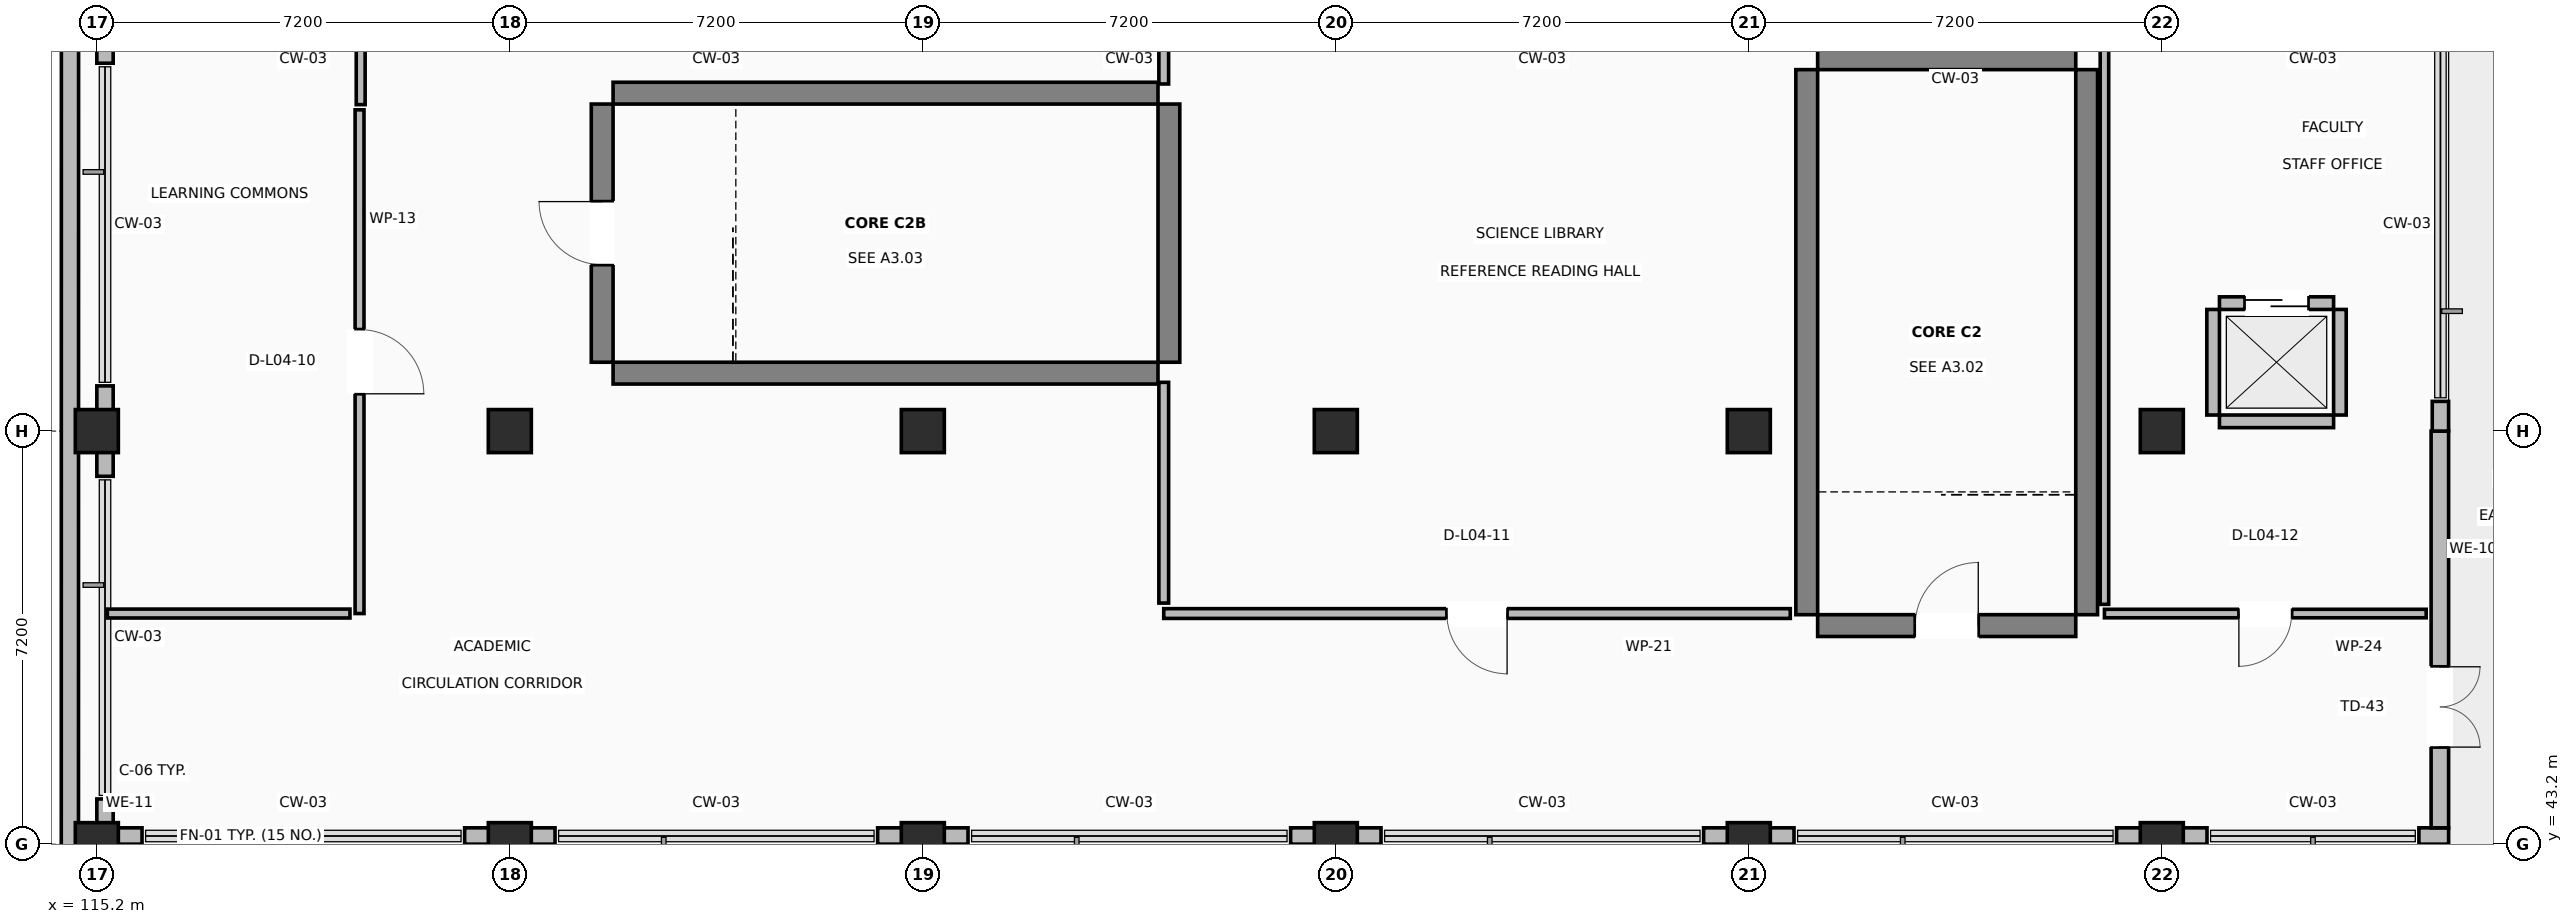
"""IFC4 building model, lengths in metres.
Left out: names, types, materials, properties, quantities, classifications, styles, units other than length and angle.
Written with IfcOpenShell. Run it as: python <this file> out.ifc"""

import sys

from ifc_helpers import new_model, si_unit, direction, frame, frame_2d, origin, origin_2d, place, context, subcontext, project, spatial, rectangle, extrude, element, fill, save


model = new_model("IFC4")
c1 = context("Model", 3, precision=1e-05, world=origin(), true_north=direction((0.0, 1.0)))
c2 = subcontext(c1, "Body", "Model", "MODEL_VIEW")
j1 = project(units=[si_unit("LENGTHUNIT", "METRE"), si_unit("PLANEANGLEUNIT", "RADIAN")], contexts=[c1])
p1 = place(None, origin())
s1 = spatial("IfcSite", under=j1, at=p1, CompositionType="ELEMENT")
p2 = place(p1, origin())
s2 = spatial("IfcBuilding", under=s1, at=p2, CompositionType="ELEMENT")
p3 = place(p2, frame((0.0, 0.0, 18.0)))
s3 = spatial("IfcBuildingStorey", under=s2, at=p3, CompositionType="ELEMENT", Elevation=18.0)
for number, where, z_axis, x_axis in (
    (1, (115.2, 43.2, 0.0), (0.0, 0.0, 1.0), (1.0, 0.0, 0.0)),
    (2, (115.2, 50.4, 0.0), (0.0, 0.0, 1.0), (1.0, 0.0, 0.0)),
    (3, (122.4, 43.2, 0.0), (0.0, 0.0, 1.0), (1.0, 0.0, 0.0)),
    (4, (122.4, 50.4, 0.0), (0.0, 0.0, 1.0), (1.0, 0.0, 0.0)),
    (5, (129.6, 43.2, 0.0), (0.0, 0.0, 1.0), (1.0, 0.0, 0.0)),
    (6, (129.6, 50.4, 0.0), (0.0, 0.0, 1.0), (1.0, 0.0, 0.0)),
    (7, (136.8, 43.2, 0.0), (0.0, 0.0, 1.0), (1.0, 0.0, 0.0)),
    (8, (136.8, 50.4, 0.0), (0.0, 0.0, 1.0), (1.0, 0.0, 0.0)),
    (9, (144.0, 43.2, 0.0), (0.0, 0.0, 1.0), (1.0, 0.0, 0.0)),
    (10, (144.0, 50.4, 0.0), (0.0, 0.0, 1.0), (1.0, 0.0, 0.0)),
    (11, (151.2, 43.2, 0.0), (0.0, 0.0, 1.0), (1.0, 0.0, 0.0)),
    (12, (151.2, 50.4, 0.0), (0.0, 0.0, 1.0), (1.0, 0.0, 0.0)),
):
    element("IfcColumn", number, at=place(p3, frame(where, z_axis=z_axis, x_axis=x_axis)), inside=s3, PredefinedType="COLUMN", context=c2, shape_type="SweptSolid", body=[
        extrude(rectangle(XDim=0.75, YDim=0.75, at=origin_2d()), origin(), (0.0, 0.0, 1.0), 4.5),
    ])
p4 = place(p3, frame((145.2, 47.01, 0.0), z_axis=(0.0, 0.0, 1.0), x_axis=(1.0, 0.0, 0.0)))
e13 = element("IfcWall", 13, at=p4, inside=s3, PredefinedType="SHEAR", context=c2, shape_type="SweptSolid", body=[
    extrude(rectangle(XDim=4.5, YDim=0.38, at=frame_2d((2.25, 0.0))), origin(), (0.0, 0.0, 1.0), 4.22),
])
p5 = place(p4, frame((1.7, 0.0, 0.0)))
e14 = element("IfcOpeningElement", 14, at=p5, cuts=e13, PredefinedType="OPENING", context=c2, shape_type="SweptSolid", body=[
    extrude(rectangle(XDim=1.1, YDim=2.15, at=frame_2d((0.55, 1.075))), frame((0.0, 0.2, 0.0), z_axis=(0.0, -1.0, 0.0), x_axis=(1.0, 0.0, 0.0)), (0.0, 0.0, 1.0), 0.4),
])
p6 = place(p3, frame((145.2, 56.89, 0.0), z_axis=(0.0, 0.0, 1.0), x_axis=(1.0, 0.0, 0.0)))
e15 = element("IfcWall", 15, at=p6, inside=s3, PredefinedType="SHEAR", context=c2, shape_type="SweptSolid", body=[
    extrude(rectangle(XDim=4.5, YDim=0.38, at=frame_2d((2.25, 0.0))), origin(), (0.0, 0.0, 1.0), 4.22),
])
for number, where, z_axis, x_axis in (
    (16, (145.01, 47.2, 0.0), (0.0, 0.0, 1.0), (0.0, 1.0, 0.0)),
    (17, (149.89, 47.2, 0.0), (0.0, 0.0, 1.0), (0.0, 1.0, 0.0)),
    (18, (124.2, 51.41, 0.0), (0.0, 0.0, 1.0), (1.0, 0.0, 0.0)),
    (19, (124.2, 56.29, 0.0), (0.0, 0.0, 1.0), (1.0, 0.0, 0.0)),
):
    element("IfcWall", number, at=place(p3, frame(where, z_axis=z_axis, x_axis=x_axis)), inside=s3, PredefinedType="SHEAR", context=c2, shape_type="SweptSolid", body=[
        extrude(rectangle(XDim=9.5, YDim=0.38, at=frame_2d((4.75, 0.0))), origin(), (0.0, 0.0, 1.0), 4.22),
    ])
p7 = place(p3, frame((124.01, 51.6, 0.0), z_axis=(0.0, 0.0, 1.0), x_axis=(0.0, 1.0, 0.0)))
e20 = element("IfcWall", 20, at=p7, inside=s3, PredefinedType="SHEAR", context=c2, shape_type="SweptSolid", body=[
    extrude(rectangle(XDim=4.5, YDim=0.38, at=frame_2d((2.25, 0.0))), origin(), (0.0, 0.0, 1.0), 4.22),
])
p8 = place(p7, frame((1.7, 0.0, 0.0)))
e21 = element("IfcOpeningElement", 21, at=p8, cuts=e20, PredefinedType="OPENING", context=c2, shape_type="SweptSolid", body=[
    extrude(rectangle(XDim=1.1, YDim=2.15, at=frame_2d((0.55, 1.075))), frame((0.0, 0.2, 0.0), z_axis=(0.0, -1.0, 0.0), x_axis=(1.0, 0.0, 0.0)), (0.0, 0.0, 1.0), 0.4),
])
p9 = place(p3, frame((133.89, 51.6, 0.0), z_axis=(0.0, 0.0, 1.0), x_axis=(0.0, 1.0, 0.0)))
e22 = element("IfcWall", 22, at=p9, inside=s3, PredefinedType="SHEAR", context=c2, shape_type="SweptSolid", body=[
    extrude(rectangle(XDim=4.5, YDim=0.38, at=frame_2d((2.25, 0.0))), origin(), (0.0, 0.0, 1.0), 4.22),
])
p10 = place(p3, frame((115.2, 43.343, 0.0), z_axis=(0.0, 0.0, 1.0), x_axis=(1.0, 0.0, 0.0)))
e23 = element("IfcWall", 23, at=p10, inside=s3, PredefinedType="STANDARD", context=c2, shape_type="SweptSolid", body=[
    extrude(rectangle(XDim=0.788, YDim=0.285, at=frame_2d((0.394, 0.0))), origin(), (0.0, 0.0, 1.0), 3.26),
])
for number, where, z_axis, x_axis in (
    (24, (121.612, 43.343, 0.0), (0.0, 0.0, 1.0), (1.0, 0.0, 0.0)),
    (25, (128.812, 43.343, 0.0), (0.0, 0.0, 1.0), (1.0, 0.0, 0.0)),
    (26, (136.012, 43.343, 0.0), (0.0, 0.0, 1.0), (1.0, 0.0, 0.0)),
):
    element("IfcWall", number, at=place(p3, frame(where, z_axis=z_axis, x_axis=x_axis)), inside=s3, PredefinedType="STANDARD", context=c2, shape_type="SweptSolid", body=[
        extrude(rectangle(XDim=1.576, YDim=0.285, at=frame_2d((0.788, 0.0))), origin(), (0.0, 0.0, 1.0), 3.26),
    ])
p11 = place(p3, frame((143.212, 43.343, 0.0), z_axis=(0.0, 0.0, 1.0), x_axis=(1.0, 0.0, 0.0)))
e27 = element("IfcWall", 27, at=p11, inside=s3, PredefinedType="STANDARD", context=c2, shape_type="SweptSolid", body=[
    extrude(rectangle(XDim=1.576, YDim=0.285, at=frame_2d((0.788, 0.0))), origin(), (0.0, 0.0, 1.0), 3.26),
])
p12 = place(p3, frame((150.412, 43.343, 0.0), z_axis=(0.0, 0.0, 1.0), x_axis=(1.0, 0.0, 0.0)))
e28 = element("IfcWall", 28, at=p12, inside=s3, PredefinedType="STANDARD", context=c2, shape_type="SweptSolid", body=[
    extrude(rectangle(XDim=1.576, YDim=0.285, at=frame_2d((0.788, 0.0))), origin(), (0.0, 0.0, 1.0), 3.26),
])
p13 = place(p3, frame((155.682, 43.343, 0.0), z_axis=(0.0, 0.0, 1.0), x_axis=(1.0, 0.0, 0.0)))
e29 = element("IfcWall", 29, at=p13, inside=s3, PredefinedType="STANDARD", context=c2, shape_type="SweptSolid", body=[
    extrude(rectangle(XDim=0.518, YDim=0.285, at=frame_2d((0.259, 0.0))), origin(), (0.0, 0.0, 1.0), 3.26),
])
p14 = place(p3, frame((156.048, 50.4, 0.0), z_axis=(0.0, 0.0, 1.0), x_axis=(0.0, -1.0, 0.0)))
e30 = element("IfcWall", 30, at=p14, inside=s3, PredefinedType="STANDARD", context=c2, shape_type="SweptSolid", body=[
    extrude(rectangle(XDim=6.915, YDim=0.305, at=frame_2d((3.458, 0.0))), origin(), (0.0, 0.0, 1.0), 3.26),
])
p15 = place(p14, frame((4.108, 0.0, 0.0)))
e31 = element("IfcOpeningElement", 31, at=p15, cuts=e30, PredefinedType="OPENING", context=c2, shape_type="SweptSolid", body=[
    extrude(rectangle(XDim=1.4, YDim=2.15, at=frame_2d((0.7, 1.075))), frame((0.0, 0.162, 0.0), z_axis=(0.0, -1.0, 0.0), x_axis=(1.0, 0.0, 0.0)), (0.0, 0.0, 1.0), 0.325),
])
p16 = place(p3, frame((156.058, 50.4, 0.0), z_axis=(0.0, 0.0, 1.0), x_axis=(0.0, 1.0, 0.0)))
e32 = element("IfcWall", 32, at=p16, inside=s3, PredefinedType="STANDARD", context=c2, shape_type="SweptSolid", body=[
    extrude(rectangle(XDim=0.518, YDim=0.285, at=frame_2d((0.259, 0.0))), origin(), (0.0, 0.0, 1.0), 3.26),
])
p17 = place(p3, frame((115.343, 57.315, 0.0), z_axis=(0.0, 0.0, 1.0), x_axis=(0.0, -1.0, 0.0)))
e33 = element("IfcWall", 33, at=p17, inside=s3, PredefinedType="STANDARD", context=c2, shape_type="SweptSolid", body=[
    extrude(rectangle(XDim=0.503, YDim=0.285, at=frame_2d((0.251, 0.0))), origin(), (0.0, 0.0, 1.0), 3.26),
])
p18 = place(p3, frame((115.343, 51.188, 0.0), z_axis=(0.0, 0.0, 1.0), x_axis=(0.0, -1.0, 0.0)))
e34 = element("IfcWall", 34, at=p18, inside=s3, PredefinedType="STANDARD", context=c2, shape_type="SweptSolid", body=[
    extrude(rectangle(XDim=1.576, YDim=0.285, at=frame_2d((0.788, 0.0))), origin(), (0.0, 0.0, 1.0), 3.26),
])
p19 = place(p3, frame((115.343, 43.988, 0.0), z_axis=(0.0, 0.0, 1.0), x_axis=(0.0, -1.0, 0.0)))
e35 = element("IfcWall", 35, at=p19, inside=s3, PredefinedType="STANDARD", context=c2, shape_type="SweptSolid", body=[
    extrude(rectangle(XDim=0.503, YDim=0.285, at=frame_2d((0.251, 0.0))), origin(), (0.0, 0.0, 1.0), 3.26),
])
p20 = place(p3, frame((114.73, 42.882, 0.0), z_axis=(0.0, 0.0, 1.0), x_axis=(0.000129880671, 0.999999991566, 0.0)))
e36 = element("IfcWall", 36, at=p20, inside=s3, PredefinedType="PARAPET", context=c2, shape_type="SweptSolid", body=[
    extrude(rectangle(XDim=15.038, YDim=0.3, at=frame_2d((7.519, 0.0))), origin(), (0.0, 0.0, 1.0), 1.18),
])
p21 = place(p3, frame((152.205, 50.57, 0.0), z_axis=(0.0, 0.0, 1.0), x_axis=(1.0, 0.0, 0.0)))
e37 = element("IfcWall", 37, at=p21, inside=s3, PredefinedType="STANDARD", context=c2, shape_type="SweptSolid", body=[
    extrude(rectangle(XDim=1.99, YDim=0.22, at=frame_2d((0.995, 0.0))), origin(), (0.0, 0.0, 1.0), 3.26),
])
p22 = place(p3, frame((152.205, 52.63, 0.0), z_axis=(0.0, 0.0, 1.0), x_axis=(1.0, 0.0, 0.0)))
e38 = element("IfcWall", 38, at=p22, inside=s3, PredefinedType="STANDARD", context=c2, shape_type="SweptSolid", body=[
    extrude(rectangle(XDim=1.99, YDim=0.22, at=frame_2d((0.995, 0.0))), origin(), (0.0, 0.0, 1.0), 3.26),
])
p23 = place(p22, frame((0.445, 0.0, 0.0)))
e39 = element("IfcOpeningElement", 39, at=p23, cuts=e38, PredefinedType="OPENING", context=c2, shape_type="SweptSolid", body=[
    extrude(rectangle(XDim=1.1, YDim=2.15, at=frame_2d((0.55, 1.075))), frame((0.0, 0.12, 0.0), z_axis=(0.0, -1.0, 0.0), x_axis=(1.0, 0.0, 0.0)), (0.0, 0.0, 1.0), 0.24),
])
for number, where, z_axis, x_axis in (
    (40, (152.095, 50.68, 0.0), (0.0, 0.0, 1.0), (0.0, 1.0, 0.0)),
    (41, (154.305, 50.68, 0.0), (0.0, 0.0, 1.0), (0.0, 1.0, 0.0)),
):
    element("IfcWall", number, at=place(p3, frame(where, z_axis=z_axis, x_axis=x_axis)), inside=s3, PredefinedType="STANDARD", context=c2, shape_type="SweptSolid", body=[
        extrude(rectangle(XDim=1.84, YDim=0.22, at=frame_2d((0.92, 0.0))), origin(), (0.0, 0.0, 1.0), 3.26),
    ])
p24 = place(p3, frame((119.78, 56.0, 0.0), z_axis=(0.0, 0.0, 1.0), x_axis=(0.0, -1.0, 0.0)))
e42 = element("IfcWall", 42, at=p24, inside=s3, PredefinedType="PARTITIONING", context=c2, shape_type="SweptSolid", body=[
    extrude(rectangle(XDim=8.78, YDim=0.155, at=frame_2d((4.39, 0.0))), origin(), (0.0, 0.0, 1.0), 3.26),
])
p25 = place(p24, frame((3.83, 0.0, 0.0)))
e43 = element("IfcOpeningElement", 43, at=p25, cuts=e42, PredefinedType="OPENING", context=c2, shape_type="SweptSolid", body=[
    extrude(rectangle(XDim=1.12, YDim=2.15, at=frame_2d((0.56, 1.075))), frame((0.0, 0.087, 0.0), z_axis=(0.0, -1.0, 0.0), x_axis=(1.0, 0.0, 0.0)), (0.0, 0.0, 1.0), 0.175),
])
p26 = place(p3, frame((119.613, 47.22, 0.0), z_axis=(0.0, 0.0, 1.0), x_axis=(-1.0, 0.0, 0.0)))
e44 = element("IfcWall", 44, at=p26, inside=s3, PredefinedType="PARTITIONING", context=c2, shape_type="SweptSolid", body=[
    extrude(rectangle(XDim=4.23, YDim=0.155, at=frame_2d((2.115, 0.0))), origin(), (0.0, 0.0, 1.0), 3.26),
])
p27 = place(p3, frame((119.8, 57.418, 0.0), z_axis=(0.0, 0.0, 1.0), x_axis=(0.0, -1.0, 0.0)))
e45 = element("IfcWall", 45, at=p27, inside=s3, PredefinedType="PARTITIONING", context=c2, shape_type="SweptSolid", body=[
    extrude(rectangle(XDim=1.328, YDim=0.155, at=frame_2d((0.664, 0.0))), origin(), (0.0, 0.0, 1.0), 3.26),
])
p28 = place(p3, frame((144.723, 47.22, 0.0), z_axis=(0.0, 0.0, 1.0), x_axis=(-1.0, 0.0, 0.0)))
e46 = element("IfcWall", 46, at=p28, inside=s3, PredefinedType="PARTITIONING", context=c2, shape_type="SweptSolid", body=[
    extrude(rectangle(XDim=10.923, YDim=0.17, at=frame_2d((5.461, 0.0))), origin(), (0.0, 0.0, 1.0), 3.26),
])
p29 = place(p28, frame((4.937, 0.0, 0.0)))
e47 = element("IfcOpeningElement", 47, at=p29, cuts=e46, PredefinedType="OPENING", context=c2, shape_type="SweptSolid", body=[
    extrude(rectangle(XDim=1.05, YDim=2.15, at=frame_2d((0.525, 1.075))), frame((0.0, 0.095, 0.0), z_axis=(0.0, -1.0, 0.0), x_axis=(1.0, 0.0, 0.0)), (0.0, 0.0, 1.0), 0.19),
])
p30 = place(p3, frame((133.8, 47.402, 0.0), z_axis=(0.0, 0.0, 1.0), x_axis=(0.0, 1.0, 0.0)))
e48 = element("IfcWall", 48, at=p30, inside=s3, PredefinedType="PARTITIONING", context=c2, shape_type="SweptSolid", body=[
    extrude(rectangle(XDim=3.848, YDim=0.17, at=frame_2d((1.924, 0.0))), origin(), (0.0, 0.0, 1.0), 3.26),
])
p31 = place(p3, frame((133.8, 56.45, 0.0), z_axis=(0.0, 0.0, 1.0), x_axis=(0.0, 1.0, 0.0)))
e49 = element("IfcWall", 49, at=p31, inside=s3, PredefinedType="PARTITIONING", context=c2, shape_type="SweptSolid", body=[
    extrude(rectangle(XDim=0.968, YDim=0.17, at=frame_2d((0.484, 0.0))), origin(), (0.0, 0.0, 1.0), 3.26),
])
p32 = place(p3, frame((155.809, 47.22, 0.0), z_axis=(0.0, 0.0, 1.0), x_axis=(-1.0, 0.0, 0.0)))
e50 = element("IfcWall", 50, at=p32, inside=s3, PredefinedType="PARTITIONING", context=c2, shape_type="SweptSolid", body=[
    extrude(rectangle(XDim=5.609, YDim=0.148, at=frame_2d((2.805, 0.0))), origin(), (0.0, 0.0, 1.0), 3.26),
])
p33 = place(p32, frame((2.345, 0.0, 0.0)))
e51 = element("IfcOpeningElement", 51, at=p33, cuts=e50, PredefinedType="OPENING", context=c2, shape_type="SweptSolid", body=[
    extrude(rectangle(XDim=0.92, YDim=2.1, at=frame_2d((0.46, 1.05))), frame((0.0, 0.084, 0.0), z_axis=(0.0, -1.0, 0.0), x_axis=(1.0, 0.0, 0.0)), (0.0, 0.0, 1.0), 0.168),
])
p34 = place(p3, frame((150.2, 47.38, 0.0), z_axis=(0.0, 0.0, 1.0), x_axis=(0.0, 1.0, 0.0)))
e52 = element("IfcWall", 52, at=p34, inside=s3, PredefinedType="PARTITIONING", context=c2, shape_type="SweptSolid", body=[
    extrude(rectangle(XDim=10.038, YDim=0.148, at=frame_2d((5.019, 0.0))), origin(), (0.0, 0.0, 1.0), 3.26),
])
p35 = place(p15, origin())
e53 = element("IfcDoor", 53, at=p35, inside=s3, OperationType="DOUBLE_DOOR_SINGLE_SWING", PredefinedType="DOOR", context=c2, shape_type="SweptSolid", body=[
    extrude(rectangle(XDim=1.4, YDim=2.15, at=frame_2d((0.7, 1.075))), frame((0.0, 0.025, 0.0), z_axis=(0.0, -1.0, 0.0), x_axis=(1.0, 0.0, 0.0)), (0.0, 0.0, 1.0), 0.05),
])
fill(e31, e53)
p36 = place(p5, origin())
e54 = element("IfcDoor", 54, at=p36, inside=s3, OperationType="SINGLE_SWING_RIGHT", PredefinedType="DOOR", context=c2, shape_type="SweptSolid", body=[
    extrude(rectangle(XDim=1.1, YDim=2.15, at=frame_2d((0.55, 1.075))), frame((0.0, 0.025, 0.0), z_axis=(0.0, -1.0, 0.0), x_axis=(1.0, 0.0, 0.0)), (0.0, 0.0, 1.0), 0.05),
])
fill(e14, e54)
p37 = place(p8, origin())
e55 = element("IfcDoor", 55, at=p37, inside=s3, OperationType="SINGLE_SWING_RIGHT", PredefinedType="DOOR", context=c2, shape_type="SweptSolid", body=[
    extrude(rectangle(XDim=1.1, YDim=2.15, at=frame_2d((0.55, 1.075))), frame((0.0, 0.025, 0.0), z_axis=(0.0, -1.0, 0.0), x_axis=(1.0, 0.0, 0.0)), (0.0, 0.0, 1.0), 0.05),
])
fill(e21, e55)
p38 = place(p23, origin())
e56 = element("IfcDoor", 56, at=p38, inside=s3, OperationType="SLIDING_TO_RIGHT", PredefinedType="DOOR", context=c2, shape_type="SweptSolid", body=[
    extrude(rectangle(XDim=1.1, YDim=2.15, at=frame_2d((0.55, 1.075))), frame((0.0, 0.025, 0.0), z_axis=(0.0, -1.0, 0.0), x_axis=(1.0, 0.0, 0.0)), (0.0, 0.0, 1.0), 0.05),
])
fill(e39, e56)
p39 = place(p25, origin())
e57 = element("IfcDoor", 57, at=p39, inside=s3, OperationType="SINGLE_SWING_RIGHT", PredefinedType="DOOR", context=c2, shape_type="SweptSolid", body=[
    extrude(rectangle(XDim=1.12, YDim=2.15, at=frame_2d((0.56, 1.075))), frame((0.0, 0.025, 0.0), z_axis=(0.0, -1.0, 0.0), x_axis=(1.0, 0.0, 0.0)), (0.0, 0.0, 1.0), 0.05),
])
fill(e43, e57)
p40 = place(p29, origin())
e58 = element("IfcDoor", 58, at=p40, inside=s3, OperationType="SINGLE_SWING_LEFT", PredefinedType="DOOR", context=c2, shape_type="SweptSolid", body=[
    extrude(rectangle(XDim=1.05, YDim=2.15, at=frame_2d((0.525, 1.075))), frame((0.0, 0.025, 0.0), z_axis=(0.0, -1.0, 0.0), x_axis=(1.0, 0.0, 0.0)), (0.0, 0.0, 1.0), 0.05),
])
fill(e47, e58)
p41 = place(p33, origin())
e59 = element("IfcDoor", 59, at=p41, inside=s3, OperationType="SINGLE_SWING_RIGHT", PredefinedType="DOOR", context=c2, shape_type="SweptSolid", body=[
    extrude(rectangle(XDim=0.92, YDim=2.1, at=frame_2d((0.46, 1.05))), frame((0.0, 0.025, 0.0), z_axis=(0.0, -1.0, 0.0), x_axis=(1.0, 0.0, 0.0)), (0.0, 0.0, 1.0), 0.05),
])
fill(e51, e59)
save(model, sys.argv[1])
